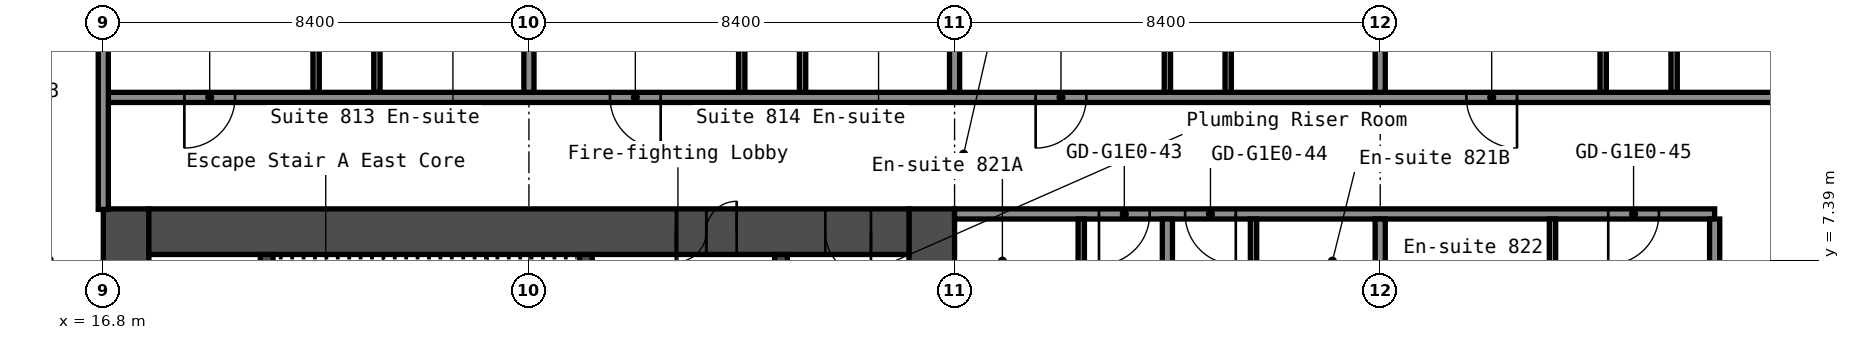
"""IFC4 building model, lengths in metres.
Left out: names, types, materials, properties, quantities, classifications, styles, units other than length and angle.
Written with IfcOpenShell. Run it as: python <this file> out.ifc"""

import sys

from ifc_helpers import new_model, si_unit, direction, frame, frame_2d, origin, place, context, subcontext, project, spatial, rectangle, extrude, element, fill, save


model = new_model("IFC4")
c1 = context("Model", 3, precision=1e-05, world=origin(), true_north=direction((0.0, 1.0)))
c2 = subcontext(c1, "Body", "Model", "MODEL_VIEW")
j1 = project(units=[si_unit("LENGTHUNIT", "METRE"), si_unit("PLANEANGLEUNIT", "RADIAN")], contexts=[c1])
p1 = place(None, origin())
s1 = spatial("IfcSite", under=j1, at=p1, CompositionType="ELEMENT")
p2 = place(p1, origin())
s2 = spatial("IfcBuilding", under=s1, at=p2, CompositionType="ELEMENT")
p3 = place(p2, frame((0.0, 0.0, 32.6)))
s3 = spatial("IfcBuildingStorey", under=s2, at=p3, CompositionType="ELEMENT", Elevation=32.6)
p4 = place(p3, frame((17.25, -8.4, 0.0), z_axis=(0.0, 0.0, 1.0), x_axis=(0.0, 1.0, 0.0)))
e1 = element("IfcWall", 1, at=p4, inside=s3, PredefinedType="SHEAR", context=c2, shape_type="SweptSolid", body=[
    extrude(rectangle(XDim=16.8, YDim=0.9, at=frame_2d((8.4, 0.0))), origin(), (0.0, 0.0, 1.0), 2.8),
])
p5 = place(p4, frame((12.75, 0.0, 0.0)))
e2 = element("IfcOpeningElement", 2, at=p5, cuts=e1, PredefinedType="OPENING", context=c2, shape_type="SweptSolid", body=[
    extrude(rectangle(XDim=1.2, YDim=2.1, at=frame_2d((0.6, 1.05))), frame((0.0, 0.46, 0.0), z_axis=(0.0, -1.0, 0.0), x_axis=(1.0, 0.0, 0.0)), (0.0, 0.0, 1.0), 0.92),
])
p6 = place(p4, frame((2.85, 0.0, 0.0)))
e3 = element("IfcOpeningElement", 3, at=p6, cuts=e1, PredefinedType="OPENING", context=c2, shape_type="SweptSolid", body=[
    extrude(rectangle(XDim=1.2, YDim=2.1, at=frame_2d((0.6, 1.05))), frame((0.0, 0.46, 0.0), z_axis=(0.0, -1.0, 0.0), x_axis=(1.0, 0.0, 0.0)), (0.0, 0.0, 1.0), 0.92),
])
p7 = place(p3, frame((33.15, -8.4, 0.0), z_axis=(0.0, 0.0, 1.0), x_axis=(0.0, 1.0, 0.0)))
e4 = element("IfcWall", 4, at=p7, inside=s3, PredefinedType="SHEAR", context=c2, shape_type="SweptSolid", body=[
    extrude(rectangle(XDim=16.8, YDim=0.9, at=frame_2d((8.4, 0.0))), origin(), (0.0, 0.0, 1.0), 2.8),
])
p8 = place(p3, frame((17.7, 7.95, 0.0), z_axis=(0.0, 0.0, 1.0), x_axis=(1.0, 0.0, 0.0)))
e5 = element("IfcWall", 5, at=p8, inside=s3, PredefinedType="SHEAR", context=c2, shape_type="SweptSolid", body=[
    extrude(rectangle(XDim=15.0, YDim=0.9, at=frame_2d((7.5, 0.0))), origin(), (0.0, 0.0, 1.0), 2.8),
])
p9 = place(p8, frame((10.4, 0.0, 0.0)))
e6 = element("IfcOpeningElement", 6, at=p9, cuts=e5, PredefinedType="OPENING", context=c2, shape_type="SweptSolid", body=[
    extrude(rectangle(XDim=1.2, YDim=2.1, at=frame_2d((0.6, 1.05))), frame((0.0, 0.46, 0.0), z_axis=(0.0, -1.0, 0.0), x_axis=(1.0, 0.0, 0.0)), (0.0, 0.0, 1.0), 0.92),
])
p10 = place(p8, frame((13.35, 0.0, 0.0)))
e7 = element("IfcOpeningElement", 7, at=p10, cuts=e5, PredefinedType="OPENING", context=c2, shape_type="SweptSolid", body=[
    extrude(rectangle(XDim=0.9, YDim=2.1, at=frame_2d((0.45, 1.05))), frame((0.0, 0.46, 0.0), z_axis=(0.0, -1.0, 0.0), x_axis=(1.0, 0.0, 0.0)), (0.0, 0.0, 1.0), 0.92),
])
p11 = place(p3, frame((20.025, 1.2, 0.0), z_axis=(0.0, 0.0, 1.0), x_axis=(0.0, 1.0, 0.0)))
e8 = element("IfcWall", 8, at=p11, inside=s3, PredefinedType="SHEAR", context=c2, shape_type="SweptSolid", body=[
    extrude(rectangle(XDim=6.3, YDim=0.25, at=frame_2d((3.15, 0.0))), origin(), (0.0, 0.0, 1.0), 2.8),
])
p12 = place(p3, frame((26.325, 3.75, 0.0), z_axis=(0.0, 0.0, 1.0), x_axis=(0.0, 1.0, 0.0)))
e9 = element("IfcWall", 9, at=p12, inside=s3, PredefinedType="SHEAR", context=c2, shape_type="SweptSolid", body=[
    extrude(rectangle(XDim=3.75, YDim=0.25, at=frame_2d((1.875, 0.0))), origin(), (0.0, 0.0, 1.0), 2.8),
])
p13 = place(p12, frame((1.25, 0.0, 0.0)))
e10 = element("IfcOpeningElement", 10, at=p13, cuts=e9, PredefinedType="OPENING", context=c2, shape_type="SweptSolid", body=[
    extrude(rectangle(XDim=1.2, YDim=2.1, at=frame_2d((0.6, 1.05))), frame((0.0, 0.135, 0.0), z_axis=(0.0, -1.0, 0.0), x_axis=(1.0, 0.0, 0.0)), (0.0, 0.0, 1.0), 0.27),
])
p14 = place(p3, frame((30.175, 1.45, 0.0), z_axis=(0.0, 0.0, 1.0), x_axis=(0.0, 1.0, 0.0)))
e11 = element("IfcWall", 11, at=p14, inside=s3, PredefinedType="SHEAR", context=c2, shape_type="SweptSolid", body=[
    extrude(rectangle(XDim=6.05, YDim=0.25, at=frame_2d((3.025, 0.0))), origin(), (0.0, 0.0, 1.0), 2.8),
])
p15 = place(p14, frame((2.625, 0.0, 0.0)))
e12 = element("IfcOpeningElement", 12, at=p15, cuts=e11, PredefinedType="OPENING", context=c2, shape_type="SweptSolid", body=[
    extrude(rectangle(XDim=1.1, YDim=2.1, at=frame_2d((0.55, 1.05))), frame((0.0, 0.135, 0.0), z_axis=(0.0, -1.0, 0.0), x_axis=(1.0, 0.0, 0.0)), (0.0, 0.0, 1.0), 0.27),
])
p16 = place(p3, frame((33.6, 8.3, 0.0), z_axis=(0.0, 0.0, 1.0), x_axis=(1.0, 0.0, 0.0)))
e13 = element("IfcWall", 13, at=p16, inside=s3, PredefinedType="PARTITIONING", context=c2, shape_type="SweptSolid", body=[
    extrude(rectangle(XDim=15.0, YDim=0.2, at=frame_2d((7.5, 0.0))), origin(), (0.0, 0.0, 1.0), 2.8),
])
p17 = place(p16, frame((2.85, 0.0, 0.0)))
e14 = element("IfcOpeningElement", 14, at=p17, cuts=e13, PredefinedType="OPENING", context=c2, shape_type="SweptSolid", body=[
    extrude(rectangle(XDim=1.0, YDim=2.1, at=frame_2d((0.5, 1.05))), frame((0.0, 0.11, 0.0), z_axis=(0.0, -1.0, 0.0), x_axis=(1.0, 0.0, 0.0)), (0.0, 0.0, 1.0), 0.22),
])
p18 = place(p16, frame((4.55, 0.0, 0.0)))
e15 = element("IfcOpeningElement", 15, at=p18, cuts=e13, PredefinedType="OPENING", context=c2, shape_type="SweptSolid", body=[
    extrude(rectangle(XDim=1.0, YDim=2.1, at=frame_2d((0.5, 1.05))), frame((0.0, 0.11, 0.0), z_axis=(0.0, -1.0, 0.0), x_axis=(1.0, 0.0, 0.0)), (0.0, 0.0, 1.0), 0.22),
])
p19 = place(p16, frame((12.9, 0.0, 0.0)))
e16 = element("IfcOpeningElement", 16, at=p19, cuts=e13, PredefinedType="OPENING", context=c2, shape_type="SweptSolid", body=[
    extrude(rectangle(XDim=1.0, YDim=2.1, at=frame_2d((0.5, 1.05))), frame((0.0, 0.11, 0.0), z_axis=(0.0, -1.0, 0.0), x_axis=(1.0, 0.0, 0.0)), (0.0, 0.0, 1.0), 0.22),
])
p20 = place(p3, frame((16.8, 10.6, 0.0), z_axis=(0.0, 0.0, 1.0), x_axis=(1.0, 0.0, 0.0)))
e17 = element("IfcWall", 17, at=p20, inside=s3, PredefinedType="PARTITIONING", context=c2, shape_type="SweptSolid", body=[
    extrude(rectangle(XDim=34.3, YDim=0.2, at=frame_2d((17.15, 0.0))), origin(), (0.0, 0.0, 1.0), 2.8),
])
p21 = place(p20, frame((1.6, 0.0, 0.0)))
e18 = element("IfcOpeningElement", 18, at=p21, cuts=e17, PredefinedType="OPENING", context=c2, shape_type="SweptSolid", body=[
    extrude(rectangle(XDim=1.0, YDim=2.1, at=frame_2d((0.5, 1.05))), frame((0.0, 0.11, 0.0), z_axis=(0.0, -1.0, 0.0), x_axis=(1.0, 0.0, 0.0)), (0.0, 0.0, 1.0), 0.22),
])
p22 = place(p20, frame((10.0, 0.0, 0.0)))
e19 = element("IfcOpeningElement", 19, at=p22, cuts=e17, PredefinedType="OPENING", context=c2, shape_type="SweptSolid", body=[
    extrude(rectangle(XDim=1.0, YDim=2.1, at=frame_2d((0.5, 1.05))), frame((0.0, 0.11, 0.0), z_axis=(0.0, -1.0, 0.0), x_axis=(1.0, 0.0, 0.0)), (0.0, 0.0, 1.0), 0.22),
])
p23 = place(p20, frame((18.4, 0.0, 0.0)))
e20 = element("IfcOpeningElement", 20, at=p23, cuts=e17, PredefinedType="OPENING", context=c2, shape_type="SweptSolid", body=[
    extrude(rectangle(XDim=1.0, YDim=2.1, at=frame_2d((0.5, 1.05))), frame((0.0, 0.11, 0.0), z_axis=(0.0, -1.0, 0.0), x_axis=(1.0, 0.0, 0.0)), (0.0, 0.0, 1.0), 0.22),
])
p24 = place(p20, frame((26.9, 0.0, 0.0)))
e21 = element("IfcOpeningElement", 21, at=p24, cuts=e17, PredefinedType="OPENING", context=c2, shape_type="SweptSolid", body=[
    extrude(rectangle(XDim=1.0, YDim=2.1, at=frame_2d((0.5, 1.05))), frame((0.0, 0.11, 0.0), z_axis=(0.0, -1.0, 0.0), x_axis=(1.0, 0.0, 0.0)), (0.0, 0.0, 1.0), 0.22),
])
p25 = place(p3, frame((16.8, 8.39, 0.0), z_axis=(0.0, 0.0, 1.0), x_axis=(0.0, 1.0, 0.0)))
e22 = element("IfcWall", 22, at=p25, inside=s3, PredefinedType="PARTITIONING", context=c2, shape_type="SweptSolid", body=[
    extrude(rectangle(XDim=11.91, YDim=0.2, at=frame_2d((5.955, 0.0))), origin(), (0.0, 0.0, 1.0), 2.8),
])
p26 = place(p3, frame((21.0, 10.7, 0.0), z_axis=(0.0, 0.0, 1.0), x_axis=(0.0, 1.0, 0.0)))
e23 = element("IfcWall", 23, at=p26, inside=s3, PredefinedType="PARTITIONING", context=c2, shape_type="SweptSolid", body=[
    extrude(rectangle(XDim=9.6, YDim=0.125, at=frame_2d((4.8, 0.0))), origin(), (0.0, 0.0, 1.0), 2.8),
])
p27 = place(p26, frame((4.05, 0.0, 0.0)))
e24 = element("IfcOpeningElement", 24, at=p27, cuts=e23, PredefinedType="OPENING", context=c2, shape_type="SweptSolid", body=[
    extrude(rectangle(XDim=0.9, YDim=2.1, at=frame_2d((0.45, 1.05))), frame((0.0, 0.073, 0.0), z_axis=(0.0, -1.0, 0.0), x_axis=(1.0, 0.0, 0.0)), (0.0, 0.0, 1.0), 0.145),
])
p28 = place(p3, frame((22.2, 10.7, 0.0), z_axis=(0.0, 0.0, 1.0), x_axis=(0.0, 1.0, 0.0)))
e25 = element("IfcWall", 25, at=p28, inside=s3, PredefinedType="PARTITIONING", context=c2, shape_type="SweptSolid", body=[
    extrude(rectangle(XDim=3.1, YDim=0.125, at=frame_2d((1.55, 0.0))), origin(), (0.0, 0.0, 1.0), 2.8),
])
p29 = place(p3, frame((25.2, 10.7, 0.0), z_axis=(0.0, 0.0, 1.0), x_axis=(0.0, 1.0, 0.0)))
e26 = element("IfcWall", 26, at=p29, inside=s3, PredefinedType="PARTITIONING", context=c2, shape_type="SweptSolid", body=[
    extrude(rectangle(XDim=9.6, YDim=0.2, at=frame_2d((4.8, 0.0))), origin(), (0.0, 0.0, 1.0), 2.8),
])
p30 = place(p3, frame((29.4, 10.7, 0.0), z_axis=(0.0, 0.0, 1.0), x_axis=(0.0, 1.0, 0.0)))
e27 = element("IfcWall", 27, at=p30, inside=s3, PredefinedType="PARTITIONING", context=c2, shape_type="SweptSolid", body=[
    extrude(rectangle(XDim=9.6, YDim=0.125, at=frame_2d((4.8, 0.0))), origin(), (0.0, 0.0, 1.0), 2.8),
])
p31 = place(p30, frame((4.05, 0.0, 0.0)))
e28 = element("IfcOpeningElement", 28, at=p31, cuts=e27, PredefinedType="OPENING", context=c2, shape_type="SweptSolid", body=[
    extrude(rectangle(XDim=0.9, YDim=2.1, at=frame_2d((0.45, 1.05))), frame((0.0, 0.073, 0.0), z_axis=(0.0, -1.0, 0.0), x_axis=(1.0, 0.0, 0.0)), (0.0, 0.0, 1.0), 0.145),
])
p32 = place(p3, frame((30.6, 10.7, 0.0), z_axis=(0.0, 0.0, 1.0), x_axis=(0.0, 1.0, 0.0)))
e29 = element("IfcWall", 29, at=p32, inside=s3, PredefinedType="PARTITIONING", context=c2, shape_type="SweptSolid", body=[
    extrude(rectangle(XDim=3.1, YDim=0.125, at=frame_2d((1.55, 0.0))), origin(), (0.0, 0.0, 1.0), 2.8),
])
p33 = place(p3, frame((33.6, 10.7, 0.0), z_axis=(0.0, 0.0, 1.0), x_axis=(0.0, 1.0, 0.0)))
e30 = element("IfcWall", 30, at=p33, inside=s3, PredefinedType="PARTITIONING", context=c2, shape_type="SweptSolid", body=[
    extrude(rectangle(XDim=9.6, YDim=0.2, at=frame_2d((4.8, 0.0))), origin(), (0.0, 0.0, 1.0), 2.8),
])
p34 = place(p3, frame((36.1, 5.3, 0.0), z_axis=(0.0, 0.0, 1.0), x_axis=(0.0, 1.0, 0.0)))
e31 = element("IfcWall", 31, at=p34, inside=s3, PredefinedType="PARTITIONING", context=c2, shape_type="SweptSolid", body=[
    extrude(rectangle(XDim=2.9, YDim=0.125, at=frame_2d((1.45, 0.0))), origin(), (0.0, 0.0, 1.0), 2.8),
])
p35 = place(p34, frame((0.6, 0.0, 0.0)))
e32 = element("IfcOpeningElement", 32, at=p35, cuts=e31, PredefinedType="OPENING", context=c2, shape_type="SweptSolid", body=[
    extrude(rectangle(XDim=0.8, YDim=2.1, at=frame_2d((0.4, 1.05))), frame((0.0, 0.073, 0.0), z_axis=(0.0, -1.0, 0.0), x_axis=(1.0, 0.0, 0.0)), (0.0, 0.0, 1.0), 0.145),
])
p36 = place(p3, frame((37.8, -8.2, 0.0), z_axis=(0.0, 0.0, 1.0), x_axis=(0.0, 1.0, 0.0)))
e33 = element("IfcWall", 33, at=p36, inside=s3, PredefinedType="PARTITIONING", context=c2, shape_type="SweptSolid", body=[
    extrude(rectangle(XDim=16.4, YDim=0.2, at=frame_2d((8.2, 0.0))), origin(), (0.0, 0.0, 1.0), 2.8),
])
p37 = place(p3, frame((37.8, 10.7, 0.0), z_axis=(0.0, 0.0, 1.0), x_axis=(0.0, 1.0, 0.0)))
e34 = element("IfcWall", 34, at=p37, inside=s3, PredefinedType="PARTITIONING", context=c2, shape_type="SweptSolid", body=[
    extrude(rectangle(XDim=9.6, YDim=0.125, at=frame_2d((4.8, 0.0))), origin(), (0.0, 0.0, 1.0), 2.8),
])
p38 = place(p37, frame((4.05, 0.0, 0.0)))
e35 = element("IfcOpeningElement", 35, at=p38, cuts=e34, PredefinedType="OPENING", context=c2, shape_type="SweptSolid", body=[
    extrude(rectangle(XDim=0.9, YDim=2.1, at=frame_2d((0.45, 1.05))), frame((0.0, 0.073, 0.0), z_axis=(0.0, -1.0, 0.0), x_axis=(1.0, 0.0, 0.0)), (0.0, 0.0, 1.0), 0.145),
])
p39 = place(p3, frame((39.0, 10.7, 0.0), z_axis=(0.0, 0.0, 1.0), x_axis=(0.0, 1.0, 0.0)))
e36 = element("IfcWall", 36, at=p39, inside=s3, PredefinedType="PARTITIONING", context=c2, shape_type="SweptSolid", body=[
    extrude(rectangle(XDim=3.1, YDim=0.125, at=frame_2d((1.55, 0.0))), origin(), (0.0, 0.0, 1.0), 2.8),
])
p40 = place(p3, frame((39.5, 5.3, 0.0), z_axis=(0.0, 0.0, 1.0), x_axis=(0.0, 1.0, 0.0)))
e37 = element("IfcWall", 37, at=p40, inside=s3, PredefinedType="PARTITIONING", context=c2, shape_type="SweptSolid", body=[
    extrude(rectangle(XDim=2.9, YDim=0.125, at=frame_2d((1.45, 0.0))), origin(), (0.0, 0.0, 1.0), 2.8),
])
p41 = place(p40, frame((0.6, 0.0, 0.0)))
e38 = element("IfcOpeningElement", 38, at=p41, cuts=e37, PredefinedType="OPENING", context=c2, shape_type="SweptSolid", body=[
    extrude(rectangle(XDim=0.8, YDim=2.1, at=frame_2d((0.4, 1.05))), frame((0.0, 0.073, 0.0), z_axis=(0.0, -1.0, 0.0), x_axis=(1.0, 0.0, 0.0)), (0.0, 0.0, 1.0), 0.145),
])
p42 = place(p3, frame((42.0, -8.2, 0.0), z_axis=(0.0, 0.0, 1.0), x_axis=(0.0, 1.0, 0.0)))
e39 = element("IfcWall", 39, at=p42, inside=s3, PredefinedType="PARTITIONING", context=c2, shape_type="SweptSolid", body=[
    extrude(rectangle(XDim=16.4, YDim=0.2, at=frame_2d((8.2, 0.0))), origin(), (0.0, 0.0, 1.0), 2.8),
])
p43 = place(p3, frame((42.0, 10.7, 0.0), z_axis=(0.0, 0.0, 1.0), x_axis=(0.0, 1.0, 0.0)))
e40 = element("IfcWall", 40, at=p43, inside=s3, PredefinedType="PARTITIONING", context=c2, shape_type="SweptSolid", body=[
    extrude(rectangle(XDim=9.6, YDim=0.2, at=frame_2d((4.8, 0.0))), origin(), (0.0, 0.0, 1.0), 2.8),
])
p44 = place(p3, frame((45.4, 4.9, 0.0), z_axis=(0.0, 0.0, 1.0), x_axis=(0.0, 1.0, 0.0)))
e41 = element("IfcWall", 41, at=p44, inside=s3, PredefinedType="PARTITIONING", context=c2, shape_type="SweptSolid", body=[
    extrude(rectangle(XDim=3.3, YDim=0.125, at=frame_2d((1.65, 0.0))), origin(), (0.0, 0.0, 1.0), 2.8),
])
p45 = place(p3, frame((46.4, 10.7, 0.0), z_axis=(0.0, 0.0, 1.0), x_axis=(0.0, 1.0, 0.0)))
e42 = element("IfcWall", 42, at=p45, inside=s3, PredefinedType="PARTITIONING", context=c2, shape_type="SweptSolid", body=[
    extrude(rectangle(XDim=9.6, YDim=0.125, at=frame_2d((4.8, 0.0))), origin(), (0.0, 0.0, 1.0), 2.8),
])
p46 = place(p45, frame((4.05, 0.0, 0.0)))
e43 = element("IfcOpeningElement", 43, at=p46, cuts=e42, PredefinedType="OPENING", context=c2, shape_type="SweptSolid", body=[
    extrude(rectangle(XDim=0.9, YDim=2.1, at=frame_2d((0.45, 1.05))), frame((0.0, 0.073, 0.0), z_axis=(0.0, -1.0, 0.0), x_axis=(1.0, 0.0, 0.0)), (0.0, 0.0, 1.0), 0.145),
])
p47 = place(p3, frame((47.8, 10.7, 0.0), z_axis=(0.0, 0.0, 1.0), x_axis=(0.0, 1.0, 0.0)))
e44 = element("IfcWall", 44, at=p47, inside=s3, PredefinedType="PARTITIONING", context=c2, shape_type="SweptSolid", body=[
    extrude(rectangle(XDim=3.1, YDim=0.125, at=frame_2d((1.55, 0.0))), origin(), (0.0, 0.0, 1.0), 2.8),
])
p48 = place(p3, frame((48.6, -8.2, 0.0), z_axis=(0.0, 0.0, 1.0), x_axis=(0.0, 1.0, 0.0)))
e45 = element("IfcWall", 45, at=p48, inside=s3, PredefinedType="PARTITIONING", context=c2, shape_type="SweptSolid", body=[
    extrude(rectangle(XDim=16.4, YDim=0.2, at=frame_2d((8.2, 0.0))), origin(), (0.0, 0.0, 1.0), 2.8),
])
p49 = place(p9, origin())
e46 = element("IfcDoor", 46, at=p49, inside=s3, OperationType="DOUBLE_DOOR_SINGLE_SWING", PredefinedType="DOOR", context=c2, shape_type="SweptSolid", body=[
    extrude(rectangle(XDim=1.2, YDim=2.1, at=frame_2d((0.6, 1.05))), frame((0.0, 0.025, 0.0), z_axis=(0.0, -1.0, 0.0), x_axis=(1.0, 0.0, 0.0)), (0.0, 0.0, 1.0), 0.05),
])
fill(e6, e46)
p50 = place(p10, origin())
e47 = element("IfcDoor", 47, at=p50, inside=s3, OperationType="SINGLE_SWING_RIGHT", PredefinedType="DOOR", context=c2, shape_type="SweptSolid", body=[
    extrude(rectangle(XDim=0.9, YDim=2.1, at=frame_2d((0.45, 1.05))), frame((0.0, 0.025, 0.0), z_axis=(0.0, -1.0, 0.0), x_axis=(1.0, 0.0, 0.0)), (0.0, 0.0, 1.0), 0.05),
])
fill(e7, e47)
p51 = place(p17, origin())
e48 = element("IfcDoor", 48, at=p51, inside=s3, OperationType="SINGLE_SWING_LEFT", PredefinedType="DOOR", context=c2, shape_type="SweptSolid", body=[
    extrude(rectangle(XDim=1.0, YDim=2.1, at=frame_2d((0.5, 1.05))), frame((0.0, 0.025, 0.0), z_axis=(0.0, -1.0, 0.0), x_axis=(1.0, 0.0, 0.0)), (0.0, 0.0, 1.0), 0.05),
])
fill(e14, e48)
p52 = place(p18, origin())
e49 = element("IfcDoor", 49, at=p52, inside=s3, OperationType="SINGLE_SWING_RIGHT", PredefinedType="DOOR", context=c2, shape_type="SweptSolid", body=[
    extrude(rectangle(XDim=1.0, YDim=2.1, at=frame_2d((0.5, 1.05))), frame((0.0, 0.025, 0.0), z_axis=(0.0, -1.0, 0.0), x_axis=(1.0, 0.0, 0.0)), (0.0, 0.0, 1.0), 0.05),
])
fill(e15, e49)
p53 = place(p19, origin())
e50 = element("IfcDoor", 50, at=p53, inside=s3, OperationType="SINGLE_SWING_LEFT", PredefinedType="DOOR", context=c2, shape_type="SweptSolid", body=[
    extrude(rectangle(XDim=1.0, YDim=2.1, at=frame_2d((0.5, 1.05))), frame((0.0, 0.025, 0.0), z_axis=(0.0, -1.0, 0.0), x_axis=(1.0, 0.0, 0.0)), (0.0, 0.0, 1.0), 0.05),
])
fill(e16, e50)
p54 = place(p21, origin())
e51 = element("IfcDoor", 51, at=p54, inside=s3, OperationType="SINGLE_SWING_LEFT", PredefinedType="DOOR", context=c2, shape_type="SweptSolid", body=[
    extrude(rectangle(XDim=1.0, YDim=2.1, at=frame_2d((0.5, 1.05))), frame((0.0, 0.025, 0.0), z_axis=(0.0, -1.0, 0.0), x_axis=(1.0, 0.0, 0.0)), (0.0, 0.0, 1.0), 0.05),
])
fill(e18, e51)
p55 = place(p22, origin())
e52 = element("IfcDoor", 52, at=p55, inside=s3, OperationType="SINGLE_SWING_RIGHT", PredefinedType="DOOR", context=c2, shape_type="SweptSolid", body=[
    extrude(rectangle(XDim=1.0, YDim=2.1, at=frame_2d((0.5, 1.05))), frame((0.0, 0.025, 0.0), z_axis=(0.0, -1.0, 0.0), x_axis=(1.0, 0.0, 0.0)), (0.0, 0.0, 1.0), 0.05),
])
fill(e19, e52)
p56 = place(p23, origin())
e53 = element("IfcDoor", 53, at=p56, inside=s3, OperationType="SINGLE_SWING_LEFT", PredefinedType="DOOR", context=c2, shape_type="SweptSolid", body=[
    extrude(rectangle(XDim=1.0, YDim=2.1, at=frame_2d((0.5, 1.05))), frame((0.0, 0.025, 0.0), z_axis=(0.0, -1.0, 0.0), x_axis=(1.0, 0.0, 0.0)), (0.0, 0.0, 1.0), 0.05),
])
fill(e20, e53)
p57 = place(p24, origin())
e54 = element("IfcDoor", 54, at=p57, inside=s3, OperationType="SINGLE_SWING_RIGHT", PredefinedType="DOOR", context=c2, shape_type="SweptSolid", body=[
    extrude(rectangle(XDim=1.0, YDim=2.1, at=frame_2d((0.5, 1.05))), frame((0.0, 0.025, 0.0), z_axis=(0.0, -1.0, 0.0), x_axis=(1.0, 0.0, 0.0)), (0.0, 0.0, 1.0), 0.05),
])
fill(e21, e54)
save(model, sys.argv[1])
